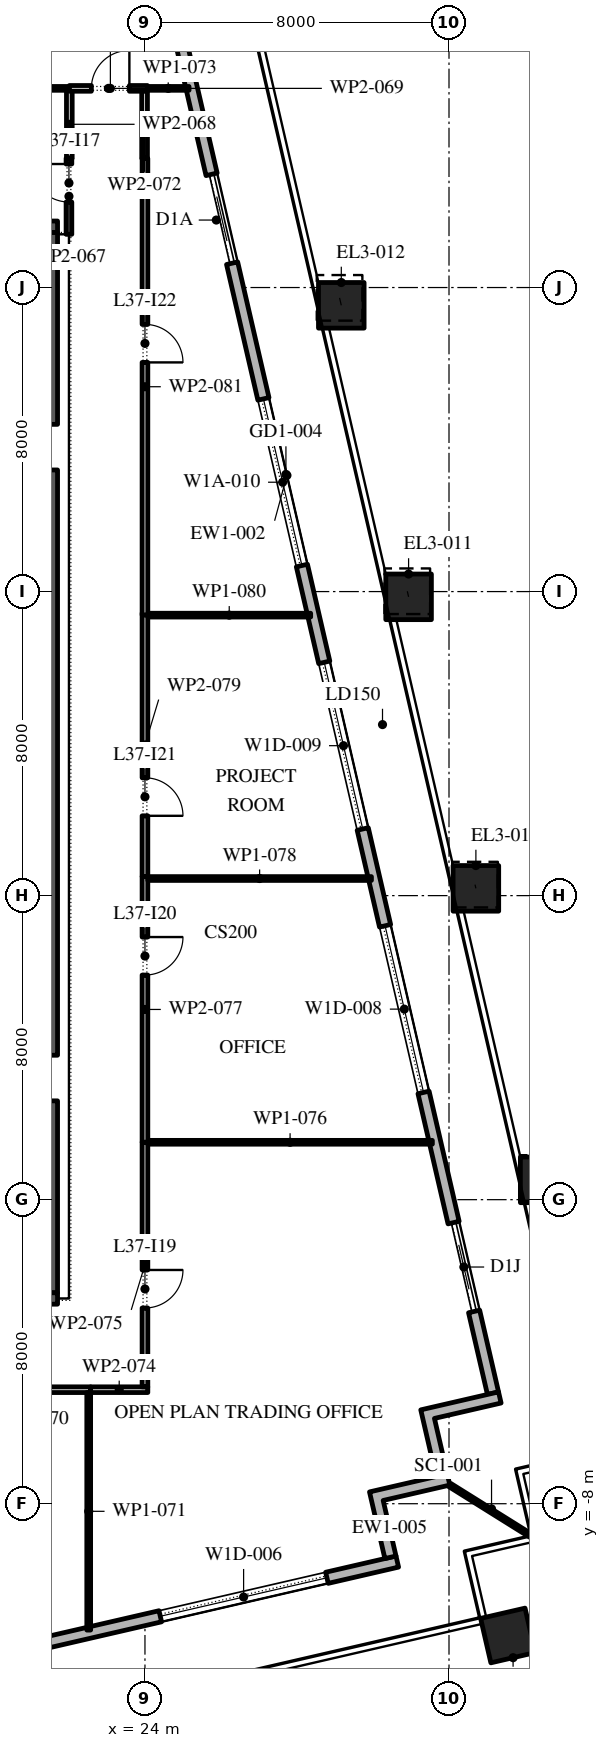
"""IFC4 building model, lengths in metres.
Left out: names, types, materials, properties, quantities, classifications, styles, units other than length and angle.
Written with IfcOpenShell. Run it as: python <this file> out.ifc"""

import sys

from ifc_helpers import new_model, si_unit, direction, frame, frame_2d, origin, origin_2d, place, context, subcontext, project, spatial, polyline, rectangle, outline, extrude, element, fill, save


model = new_model("IFC4")
c1 = context("Model", 3, precision=1e-05, world=origin(), true_north=direction((0.0, 1.0)))
c2 = subcontext(c1, "Body", "Model", "MODEL_VIEW")
j1 = project(units=[si_unit("LENGTHUNIT", "METRE"), si_unit("PLANEANGLEUNIT", "RADIAN")], contexts=[c1])
p1 = place(None, origin())
s1 = spatial("IfcSite", under=j1, at=p1, CompositionType="ELEMENT")
p2 = place(p1, origin())
s2 = spatial("IfcBuilding", under=s1, at=p2, CompositionType="ELEMENT")
p3 = place(p2, frame((0.0, 0.0, 171.6)))
s3 = spatial("IfcBuildingStorey", under=s2, at=p3, CompositionType="ELEMENT", Elevation=171.6)
p4 = place(p3, frame((33.551, -11.467, 0.0), z_axis=(0.0, 0.0, 1.0), x_axis=(0.974370064785, 0.224951054344, 0.0)))
e1 = element("IfcColumn", 1, at=p4, inside=s3, PredefinedType="COLUMN", context=c2, shape_type="SweptSolid", body=[
    extrude(rectangle(XDim=1.2, YDim=1.2, at=origin_2d()), origin(), (0.0, 0.0, 1.0), 4.2),
])
p5 = place(p3, frame((34.479, 0.521, 0.0), z_axis=(-0.002731884952, 0.01168316756, 0.999928017609), x_axis=(-0.973733900744, -0.227689021567, 0.0)))
e2 = element("IfcColumn", 2, at=p5, inside=s3, PredefinedType="COLUMN", context=c2, shape_type="SweptSolid", body=[
    extrude(rectangle(XDim=1.2, YDim=1.2, at=origin_2d()), origin(), (0.0, 0.0, 1.0), 4.2),
])
p6 = place(p3, frame((32.708, 8.191, 0.0), z_axis=(-0.005404472139, 0.023419379268, 0.999711120452), x_axis=(-0.974391195695, -0.224859506699, 0.0)))
e3 = element("IfcColumn", 3, at=p6, inside=s3, PredefinedType="COLUMN", context=c2, shape_type="SweptSolid", body=[
    extrude(rectangle(XDim=1.2, YDim=1.2, at=origin_2d()), origin(), (0.0, 0.0, 1.0), 4.201),
])
p7 = place(p3, frame((30.937, 15.862, 0.0), z_axis=(-0.008132851642, 0.035029353857, 0.999353191366), x_axis=(-0.974090845759, -0.226157078617, 0.0)))
e4 = element("IfcColumn", 4, at=p7, inside=s3, PredefinedType="COLUMN", context=c2, shape_type="SweptSolid", body=[
    extrude(rectangle(XDim=1.2, YDim=1.2, at=origin_2d()), origin(), (0.0, 0.0, 1.0), 4.203),
])
p8 = place(p3, frame((29.166, 23.532, 0.0), z_axis=(-0.010799619665, 0.046740289408, 0.998848694028), x_axis=(-0.974329962248, -0.225124686929, 0.0)))
e5 = element("IfcColumn", 5, at=p8, inside=s3, PredefinedType="COLUMN", context=c2, shape_type="SweptSolid", body=[
    extrude(rectangle(XDim=1.2, YDim=1.2, at=origin_2d()), origin(), (0.0, 0.0, 1.0), 4.205),
])
p9 = place(p3, frame((-17.592, -20.657, 0.0), z_axis=(0.0, 0.0, 1.0), x_axis=(0.974370243697, 0.224950279389, 0.0)))
e6 = element("IfcWall", 6, at=p9, inside=s3, PredefinedType="STANDARD", context=c2, shape_type="SweptSolid", body=[
    extrude(rectangle(XDim=49.5, YDim=0.3, at=frame_2d((24.75, 0.0))), origin(), (0.0, 0.0, 1.0), 4.0),
])
p10 = place(p9, frame((3.6, 0.0, 0.0)))
e7 = element("IfcOpeningElement", 7, at=p10, cuts=e6, PredefinedType="OPENING", context=c2, shape_type="SweptSolid", body=[
    extrude(rectangle(XDim=2.4, YDim=3.5, at=frame_2d((1.2, 1.75))), frame((0.0, 0.16, 0.0), z_axis=(0.0, -1.0, 0.0), x_axis=(1.0, 0.0, 0.0)), (0.0, 0.0, 1.0), 0.32),
])
p11 = place(p9, frame((9.9, 0.0, 0.45)))
e8 = element("IfcOpeningElement", 8, at=p11, cuts=e6, PredefinedType="OPENING", context=c2, shape_type="SweptSolid", body=[
    extrude(rectangle(XDim=4.5, YDim=2.575, at=frame_2d((2.25, 1.288))), frame((0.0, 0.16, 0.0), z_axis=(0.0, -1.0, 0.0), x_axis=(1.0, 0.0, 0.0)), (0.0, 0.0, 1.0), 0.32),
])
p12 = place(p9, frame((18.2, 0.0, 0.45)))
e9 = element("IfcOpeningElement", 9, at=p12, cuts=e6, PredefinedType="OPENING", context=c2, shape_type="SweptSolid", body=[
    extrude(rectangle(XDim=4.5, YDim=3.05, at=frame_2d((2.25, 1.525))), frame((0.0, 0.16, 0.0), z_axis=(0.0, -1.0, 0.0), x_axis=(1.0, 0.0, 0.0)), (0.0, 0.0, 1.0), 0.32),
])
p13 = place(p9, frame((26.5, 0.0, 0.45)))
e10 = element("IfcOpeningElement", 10, at=p13, cuts=e6, PredefinedType="OPENING", context=c2, shape_type="SweptSolid", body=[
    extrude(rectangle(XDim=4.5, YDim=2.75, at=frame_2d((2.25, 1.375))), frame((0.0, 0.16, 0.0), z_axis=(0.0, -1.0, 0.0), x_axis=(1.0, 0.0, 0.0)), (0.0, 0.0, 1.0), 0.32),
])
p14 = place(p9, frame((36.8, 0.0, 0.0)))
e11 = element("IfcOpeningElement", 11, at=p14, cuts=e6, PredefinedType="OPENING", context=c2, shape_type="SweptSolid", body=[
    extrude(rectangle(XDim=2.4, YDim=3.275, at=frame_2d((1.2, 1.637))), frame((0.0, 0.16, 0.0), z_axis=(0.0, -1.0, 0.0), x_axis=(1.0, 0.0, 0.0)), (0.0, 0.0, 1.0), 0.32),
])
p15 = place(p9, frame((43.1, 0.0, 0.45)))
e12 = element("IfcOpeningElement", 12, at=p15, cuts=e6, PredefinedType="OPENING", context=c2, shape_type="SweptSolid", body=[
    extrude(rectangle(XDim=4.5, YDim=2.875, at=frame_2d((2.25, 1.438))), frame((0.0, 0.16, 0.0), z_axis=(0.0, -1.0, 0.0), x_axis=(1.0, 0.0, 0.0)), (0.0, 0.0, 1.0), 0.32),
])
p16 = place(p3, frame((33.157, -5.092, 0.0), z_axis=(0.0, 0.0, 1.0), x_axis=(-0.224950279389, 0.974370243697, 0.0)))
e13 = element("IfcWall", 13, at=p16, inside=s3, PredefinedType="STANDARD", context=c2, shape_type="SweptSolid", body=[
    extrude(rectangle(XDim=49.5, YDim=0.3, at=frame_2d((24.75, 0.0))), origin(), (0.0, 0.0, 1.0), 4.0),
])
p17 = place(p16, frame((2.207, 0.0, 0.0)))
e14 = element("IfcOpeningElement", 14, at=p17, cuts=e13, PredefinedType="OPENING", context=c2, shape_type="SweptSolid", body=[
    extrude(rectangle(XDim=2.4, YDim=3.125, at=frame_2d((1.2, 1.562))), frame((0.0, 0.16, 0.0), z_axis=(0.0, -1.0, 0.0), x_axis=(1.0, 0.0, 0.0)), (0.0, 0.0, 1.0), 0.32),
])
p18 = place(p16, frame((8.121, 0.0, 0.45)))
e15 = element("IfcOpeningElement", 15, at=p18, cuts=e13, PredefinedType="OPENING", context=c2, shape_type="SweptSolid", body=[
    extrude(rectangle(XDim=4.5, YDim=2.875, at=frame_2d((2.25, 1.438))), frame((0.0, 0.16, 0.0), z_axis=(0.0, -1.0, 0.0), x_axis=(1.0, 0.0, 0.0)), (0.0, 0.0, 1.0), 0.32),
])
p19 = place(p16, frame((15.236, 0.0, 0.45)))
e16 = element("IfcOpeningElement", 16, at=p19, cuts=e13, PredefinedType="OPENING", context=c2, shape_type="SweptSolid", body=[
    extrude(rectangle(XDim=4.5, YDim=2.875, at=frame_2d((2.25, 1.438))), frame((0.0, 0.16, 0.0), z_axis=(0.0, -1.0, 0.0), x_axis=(1.0, 0.0, 0.0)), (0.0, 0.0, 1.0), 0.32),
])
p20 = place(p16, frame((22.35, 0.0, 0.45)))
e17 = element("IfcOpeningElement", 17, at=p20, cuts=e13, PredefinedType="OPENING", context=c2, shape_type="SweptSolid", body=[
    extrude(rectangle(XDim=4.5, YDim=3.0, at=frame_2d((2.25, 1.5))), frame((0.0, 0.16, 0.0), z_axis=(0.0, -1.0, 0.0), x_axis=(1.0, 0.0, 0.0)), (0.0, 0.0, 1.0), 0.32),
])
p21 = place(p16, frame((30.514, 0.0, 0.0)))
e18 = element("IfcOpeningElement", 18, at=p21, cuts=e13, PredefinedType="OPENING", context=c2, shape_type="SweptSolid", body=[
    extrude(rectangle(XDim=2.4, YDim=3.45, at=frame_2d((1.2, 1.725))), frame((0.0, 0.16, 0.0), z_axis=(0.0, -1.0, 0.0), x_axis=(1.0, 0.0, 0.0)), (0.0, 0.0, 1.0), 0.32),
])
p22 = place(p16, frame((36.579, 0.0, 0.45)))
e19 = element("IfcOpeningElement", 19, at=p22, cuts=e13, PredefinedType="OPENING", context=c2, shape_type="SweptSolid", body=[
    extrude(rectangle(XDim=4.5, YDim=3.05, at=frame_2d((2.25, 1.525))), frame((0.0, 0.16, 0.0), z_axis=(0.0, -1.0, 0.0), x_axis=(1.0, 0.0, 0.0)), (0.0, 0.0, 1.0), 0.32),
])
p23 = place(p16, frame((43.693, 0.0, 0.45)))
e20 = element("IfcOpeningElement", 20, at=p23, cuts=e13, PredefinedType="OPENING", context=c2, shape_type="SweptSolid", body=[
    extrude(rectangle(XDim=4.5, YDim=3.05, at=frame_2d((2.25, 1.525))), frame((0.0, 0.16, 0.0), z_axis=(0.0, -1.0, 0.0), x_axis=(1.0, 0.0, 0.0)), (0.0, 0.0, 1.0), 0.32),
])
p24 = place(p3, origin())
e21 = element("IfcWall", 21, at=p24, inside=s3, PredefinedType="STANDARD", context=c2, shape_type="SweptSolid", body=[
    extrude(outline(polyline([(31.662, -7.285), (31.257, -5.531), (33.303, -5.058), (33.371, -5.351), (31.617, -5.756), (32.022, -7.51), (30.268, -7.914), (30.605, -9.376), (30.313, -9.443), (29.908, -7.69), (31.662, -7.285)])), origin(), (0.0, 0.0, 1.0), 4.0),
])
p25 = place(p3, frame((32.022, -7.51, -0.05), z_axis=(0.0, 0.0, 1.0), x_axis=(0.848047176257, -0.529920736377, 0.0)))
e22 = element("IfcWall", 22, at=p25, inside=s3, PredefinedType="STANDARD", context=c2, shape_type="SweptSolid", body=[
    extrude(rectangle(XDim=2.526, YDim=0.1, at=frame_2d((1.263, 0.0))), origin(), (0.0, 0.0, 1.0), 4.05),
])
p26 = place(p3, frame((21.35, -2.45, 0.0), z_axis=(0.0, 0.0, 1.0), x_axis=(0.0, 1.0, 0.0)))
e23 = element("IfcWall", 23, at=p26, inside=s3, PredefinedType="SHEAR", context=c2, shape_type="SweptSolid", body=[
    extrude(rectangle(XDim=27.9, YDim=0.7, at=frame_2d((13.95, 0.0))), origin(), (0.0, 0.0, 1.0), 4.0),
])
p27 = place(p26, frame((5.05, 0.0, 0.0)))
e24 = element("IfcOpeningElement", 24, at=p27, cuts=e23, PredefinedType="OPENING", context=c2, shape_type="SweptSolid", body=[
    extrude(rectangle(XDim=1.2, YDim=2.1, at=frame_2d((0.6, 1.05))), frame((0.0, 0.36, 0.0), z_axis=(0.0, -1.0, 0.0), x_axis=(1.0, 0.0, 0.0)), (0.0, 0.0, 1.0), 0.72),
])
p28 = place(p26, frame((21.65, 0.0, 0.0)))
e25 = element("IfcOpeningElement", 25, at=p28, cuts=e23, PredefinedType="OPENING", context=c2, shape_type="SweptSolid", body=[
    extrude(rectangle(XDim=1.2, YDim=2.1, at=frame_2d((0.6, 1.05))), frame((0.0, 0.36, 0.0), z_axis=(0.0, -1.0, 0.0), x_axis=(1.0, 0.0, 0.0)), (0.0, 0.0, 1.0), 0.72),
])
for number, where, z_axis, x_axis in (
    (26, (10.3, -2.6, 0.0), (0.0, 0.0, 1.0), (1.0, 0.0, 0.0)),
    (27, (10.3, 25.6, 0.0), (0.0, 0.0, 1.0), (1.0, 0.0, 0.0)),
):
    element("IfcWall", number, at=place(p3, frame(where, z_axis=z_axis, x_axis=x_axis)), inside=s3, PredefinedType="SHEAR", context=c2, shape_type="SweptSolid", body=[
        extrude(rectangle(XDim=11.4, YDim=0.3, at=frame_2d((5.7, 0.0))), origin(), (0.0, 0.0, 1.0), 4.0),
    ])
p29 = place(p3, frame((17.97, 29.24, 0.0), z_axis=(0.0, 0.0, 1.0), x_axis=(1.0, 0.0, 0.0)))
e28 = element("IfcWall", 28, at=p29, inside=s3, PredefinedType="PARTITIONING", context=c2, shape_type="SweptSolid", body=[
    extrude(rectangle(XDim=4.04, YDim=0.1, at=frame_2d((2.02, 0.0))), origin(), (0.0, 0.0, 1.0), 4.0),
])
p30 = place(p3, frame((22.0, 25.4, 0.0), z_axis=(0.0, 0.0, 1.0), x_axis=(0.0, 1.0, 0.0)))
e29 = element("IfcWall", 29, at=p30, inside=s3, PredefinedType="PARTITIONING", context=c2, shape_type="SweptSolid", body=[
    extrude(rectangle(XDim=2.0, YDim=0.15, at=frame_2d((1.0, 0.0))), origin(), (0.0, 0.0, 1.0), 4.0),
])
p31 = place(p30, frame((0.85, 0.0, 0.0)))
e30 = element("IfcOpeningElement", 30, at=p31, cuts=e29, PredefinedType="OPENING", context=c2, shape_type="SweptSolid", body=[
    extrude(rectangle(XDim=1.0, YDim=2.1, at=frame_2d((0.5, 1.05))), frame((0.0, 0.085, 0.0), z_axis=(0.0, -1.0, 0.0), x_axis=(1.0, 0.0, 0.0)), (0.0, 0.0, 1.0), 0.17),
])
p32 = place(p3, frame((22.01, 27.4, 0.0), z_axis=(0.0, 0.0, 1.0), x_axis=(0.0, 1.0, 0.0)))
e31 = element("IfcWall", 31, at=p32, inside=s3, PredefinedType="PARTITIONING", context=c2, shape_type="SweptSolid", body=[
    extrude(rectangle(XDim=1.79, YDim=0.15, at=frame_2d((0.895, 0.0))), origin(), (0.0, 0.0, 1.0), 4.0),
])
p33 = place(p3, frame((22.01, 29.24, 0.0), z_axis=(0.0, 0.0, 1.0), x_axis=(1.0, 0.0, 0.0)))
e32 = element("IfcWall", 32, at=p33, inside=s3, PredefinedType="PARTITIONING", context=c2, shape_type="SweptSolid", body=[
    extrude(rectangle(XDim=2.055, YDim=0.15, at=frame_2d((1.027, 0.0))), origin(), (0.0, 0.0, 1.0), 4.0),
])
p34 = place(p33, frame((0.58, 0.0, 0.0)))
e33 = element("IfcOpeningElement", 33, at=p34, cuts=e32, PredefinedType="OPENING", context=c2, shape_type="SweptSolid", body=[
    extrude(rectangle(XDim=1.0, YDim=2.1, at=frame_2d((0.5, 1.05))), frame((0.0, 0.085, 0.0), z_axis=(0.0, -1.0, 0.0), x_axis=(1.0, 0.0, 0.0)), (0.0, 0.0, 1.0), 0.17),
])
p35 = place(p3, frame((22.57, -5.0, 0.0), z_axis=(0.0, 0.0, 1.0), x_axis=(-1.0, 0.0, 0.0)))
e34 = element("IfcWall", 34, at=p35, inside=s3, PredefinedType="PARTITIONING", context=c2, shape_type="SweptSolid", body=[
    extrude(rectangle(XDim=4.65, YDim=0.15, at=frame_2d((2.325, 0.0))), origin(), (0.0, 0.0, 1.0), 4.0),
])
p36 = place(p35, frame((2.75, 0.0, 0.0)))
e35 = element("IfcOpeningElement", 35, at=p36, cuts=e34, PredefinedType="OPENING", context=c2, shape_type="SweptSolid", body=[
    extrude(rectangle(XDim=1.0, YDim=2.1, at=frame_2d((0.5, 1.05))), frame((0.0, 0.085, 0.0), z_axis=(0.0, -1.0, 0.0), x_axis=(1.0, 0.0, 0.0)), (0.0, 0.0, 1.0), 0.17),
])
p37 = place(p3, frame((22.52, -5.075, 0.0), z_axis=(0.0, 0.0, 1.0), x_axis=(0.0, -1.0, 0.0)))
e36 = element("IfcWall", 36, at=p37, inside=s3, PredefinedType="PARTITIONING", context=c2, shape_type="SweptSolid", body=[
    extrude(rectangle(XDim=6.25, YDim=0.1, at=frame_2d((3.125, 0.0))), origin(), (0.0, 0.0, 1.0), 4.0),
])
p38 = place(p3, frame((23.99, 29.165, 0.0), z_axis=(0.0, 0.0, 1.0), x_axis=(0.0, -1.0, 0.0)))
e37 = element("IfcWall", 37, at=p38, inside=s3, PredefinedType="PARTITIONING", context=c2, shape_type="SweptSolid", body=[
    extrude(rectangle(XDim=1.765, YDim=0.15, at=frame_2d((0.883, 0.0))), origin(), (0.0, 0.0, 1.0), 4.0),
])
p39 = place(p3, frame((24.065, 29.24, 0.0), z_axis=(0.0, 0.0, 1.0), x_axis=(1.0, 0.0, 0.0)))
e38 = element("IfcWall", 38, at=p39, inside=s3, PredefinedType="PARTITIONING", context=c2, shape_type="SweptSolid", body=[
    extrude(rectangle(XDim=1.095, YDim=0.1, at=frame_2d((0.547, 0.0))), origin(), (0.0, 0.0, 1.0), 4.0),
])
p40 = place(p3, frame((24.075, -5.0, 0.0), z_axis=(0.0, 0.0, 1.0), x_axis=(-1.0, 0.0, 0.0)))
e39 = element("IfcWall", 39, at=p40, inside=s3, PredefinedType="PARTITIONING", context=c2, shape_type="SweptSolid", body=[
    extrude(rectangle(XDim=1.505, YDim=0.15, at=frame_2d((0.752, 0.0))), origin(), (0.0, 0.0, 1.0), 4.0),
])
p41 = place(p3, frame((24.0, 1.51, 0.0), z_axis=(0.0, 0.0, 1.0), x_axis=(0.0, -1.0, 0.0)))
e40 = element("IfcWall", 40, at=p41, inside=s3, PredefinedType="PARTITIONING", context=c2, shape_type="SweptSolid", body=[
    extrude(rectangle(XDim=6.435, YDim=0.15, at=frame_2d((3.218, 0.0))), origin(), (0.0, 0.0, 1.0), 4.0),
])
p42 = place(p41, frame((3.36, 0.0, 0.0)))
e41 = element("IfcOpeningElement", 41, at=p42, cuts=e40, PredefinedType="OPENING", context=c2, shape_type="SweptSolid", body=[
    extrude(rectangle(XDim=1.0, YDim=2.1, at=frame_2d((0.5, 1.05))), frame((0.0, 0.085, 0.0), z_axis=(0.0, -1.0, 0.0), x_axis=(1.0, 0.0, 0.0)), (0.0, 0.0, 1.0), 0.17),
])
p43 = place(p3, frame((24.075, 1.51, 0.0), z_axis=(0.0, 0.0, 1.0), x_axis=(1.0, 0.0, 0.0)))
e42 = element("IfcWall", 42, at=p43, inside=s3, PredefinedType="PARTITIONING", context=c2, shape_type="SweptSolid", body=[
    extrude(rectangle(XDim=7.487, YDim=0.1, at=frame_2d((3.744, 0.0))), origin(), (0.0, 0.0, 1.0), 4.0),
])
p44 = place(p3, frame((24.0, 8.5, 0.0), z_axis=(0.0, 0.0, 1.0), x_axis=(0.0, -1.0, 0.0)))
e43 = element("IfcWall", 43, at=p44, inside=s3, PredefinedType="PARTITIONING", context=c2, shape_type="SweptSolid", body=[
    extrude(rectangle(XDim=6.99, YDim=0.15, at=frame_2d((3.495, 0.0))), origin(), (0.0, 0.0, 1.0), 4.0),
])
p45 = place(p44, frame((1.59, 0.0, 0.0)))
e44 = element("IfcOpeningElement", 44, at=p45, cuts=e43, PredefinedType="OPENING", context=c2, shape_type="SweptSolid", body=[
    extrude(rectangle(XDim=1.0, YDim=2.1, at=frame_2d((0.5, 1.05))), frame((0.0, 0.085, 0.0), z_axis=(0.0, -1.0, 0.0), x_axis=(1.0, 0.0, 0.0)), (0.0, 0.0, 1.0), 0.17),
])
p46 = place(p3, frame((24.075, 8.45, 0.0), z_axis=(0.0, 0.0, 1.0), x_axis=(1.0, 0.0, 0.0)))
e45 = element("IfcWall", 45, at=p46, inside=s3, PredefinedType="PARTITIONING", context=c2, shape_type="SweptSolid", body=[
    extrude(rectangle(XDim=5.884, YDim=0.1, at=frame_2d((2.942, 0.0))), origin(), (0.0, 0.0, 1.0), 4.0),
])
p47 = place(p3, frame((24.0, 15.43, 0.0), z_axis=(0.0, 0.0, 1.0), x_axis=(0.0, -1.0, 0.0)))
e46 = element("IfcWall", 46, at=p47, inside=s3, PredefinedType="PARTITIONING", context=c2, shape_type="SweptSolid", body=[
    extrude(rectangle(XDim=6.93, YDim=0.15, at=frame_2d((3.465, 0.0))), origin(), (0.0, 0.0, 1.0), 4.0),
])
p48 = place(p47, frame((4.33, 0.0, 0.0)))
e47 = element("IfcOpeningElement", 47, at=p48, cuts=e46, PredefinedType="OPENING", context=c2, shape_type="SweptSolid", body=[
    extrude(rectangle(XDim=1.0, YDim=2.1, at=frame_2d((0.5, 1.05))), frame((0.0, 0.085, 0.0), z_axis=(0.0, -1.0, 0.0), x_axis=(1.0, 0.0, 0.0)), (0.0, 0.0, 1.0), 0.17),
])
p49 = place(p3, frame((24.075, 15.38, 0.0), z_axis=(0.0, 0.0, 1.0), x_axis=(1.0, 0.0, 0.0)))
e48 = element("IfcWall", 48, at=p49, inside=s3, PredefinedType="PARTITIONING", context=c2, shape_type="SweptSolid", body=[
    extrude(rectangle(XDim=4.285, YDim=0.1, at=frame_2d((2.143, 0.0))), origin(), (0.0, 0.0, 1.0), 4.0),
])
p50 = place(p3, frame((24.0, 27.4, 0.0), z_axis=(0.0, 0.0, 1.0), x_axis=(0.0, -1.0, 0.0)))
e49 = element("IfcWall", 49, at=p50, inside=s3, PredefinedType="PARTITIONING", context=c2, shape_type="SweptSolid", body=[
    extrude(rectangle(XDim=12.02, YDim=0.15, at=frame_2d((6.01, 0.0))), origin(), (0.0, 0.0, 1.0), 4.0),
])
p51 = place(p50, frame((4.37, 0.0, 0.0)))
e50 = element("IfcOpeningElement", 50, at=p51, cuts=e49, PredefinedType="OPENING", context=c2, shape_type="SweptSolid", body=[
    extrude(rectangle(XDim=1.0, YDim=2.1, at=frame_2d((0.5, 1.05))), frame((0.0, 0.085, 0.0), z_axis=(0.0, -1.0, 0.0), x_axis=(1.0, 0.0, 0.0)), (0.0, 0.0, 1.0), 0.17),
])
p52 = place(p15, origin())
e51 = element("IfcWindow", 51, at=p52, inside=s3, PartitioningType="DOUBLE_PANEL_VERTICAL", PredefinedType="WINDOW", context=c2, shape_type="SweptSolid", body=[
    extrude(rectangle(XDim=4.5, YDim=2.875, at=frame_2d((2.25, 1.438))), frame((0.0, 0.03, 0.0), z_axis=(0.0, -1.0, 0.0), x_axis=(1.0, 0.0, 0.0)), (0.0, 0.0, 1.0), 0.06),
])
fill(e12, e51)
p53 = place(p17, origin())
e52 = element("IfcDoor", 52, at=p53, inside=s3, OperationType="DOUBLE_DOOR_SLIDING", PredefinedType="DOOR", context=c2, shape_type="SweptSolid", body=[
    extrude(rectangle(XDim=2.4, YDim=3.125, at=frame_2d((1.2, 1.562))), frame((0.0, 0.025, 0.0), z_axis=(0.0, -1.0, 0.0), x_axis=(1.0, 0.0, 0.0)), (0.0, 0.0, 1.0), 0.05),
])
fill(e14, e52)
p54 = place(p18, origin())
e53 = element("IfcWindow", 53, at=p54, inside=s3, PartitioningType="DOUBLE_PANEL_VERTICAL", PredefinedType="WINDOW", context=c2, shape_type="SweptSolid", body=[
    extrude(rectangle(XDim=4.5, YDim=2.875, at=frame_2d((2.25, 1.438))), frame((0.0, 0.03, 0.0), z_axis=(0.0, -1.0, 0.0), x_axis=(1.0, 0.0, 0.0)), (0.0, 0.0, 1.0), 0.06),
])
fill(e15, e53)
p55 = place(p19, origin())
e54 = element("IfcWindow", 54, at=p55, inside=s3, PartitioningType="DOUBLE_PANEL_VERTICAL", PredefinedType="WINDOW", context=c2, shape_type="SweptSolid", body=[
    extrude(rectangle(XDim=4.5, YDim=2.875, at=frame_2d((2.25, 1.438))), frame((0.0, 0.03, 0.0), z_axis=(0.0, -1.0, 0.0), x_axis=(1.0, 0.0, 0.0)), (0.0, 0.0, 1.0), 0.06),
])
fill(e16, e54)
p56 = place(p20, origin())
e55 = element("IfcWindow", 55, at=p56, inside=s3, PartitioningType="DOUBLE_PANEL_VERTICAL", PredefinedType="WINDOW", context=c2, shape_type="SweptSolid", body=[
    extrude(rectangle(XDim=4.5, YDim=3.0, at=frame_2d((2.25, 1.5))), frame((0.0, 0.03, 0.0), z_axis=(0.0, -1.0, 0.0), x_axis=(1.0, 0.0, 0.0)), (0.0, 0.0, 1.0), 0.06),
])
fill(e17, e55)
p57 = place(p21, origin())
e56 = element("IfcDoor", 56, at=p57, inside=s3, OperationType="DOUBLE_DOOR_SLIDING", PredefinedType="DOOR", context=c2, shape_type="SweptSolid", body=[
    extrude(rectangle(XDim=2.4, YDim=3.45, at=frame_2d((1.2, 1.725))), frame((0.0, 0.025, 0.0), z_axis=(0.0, -1.0, 0.0), x_axis=(1.0, 0.0, 0.0)), (0.0, 0.0, 1.0), 0.05),
])
fill(e18, e56)
p58 = place(p31, origin())
e57 = element("IfcDoor", 57, at=p58, inside=s3, OperationType="SINGLE_SWING_LEFT", PredefinedType="DOOR", context=c2, shape_type="SweptSolid", body=[
    extrude(rectangle(XDim=1.0, YDim=2.1, at=frame_2d((0.5, 1.05))), frame((0.0, 0.025, 0.0), z_axis=(0.0, -1.0, 0.0), x_axis=(1.0, 0.0, 0.0)), (0.0, 0.0, 1.0), 0.05),
])
fill(e30, e57)
p59 = place(p42, origin())
e58 = element("IfcDoor", 58, at=p59, inside=s3, OperationType="SINGLE_SWING_RIGHT", PredefinedType="DOOR", context=c2, shape_type="SweptSolid", body=[
    extrude(rectangle(XDim=1.0, YDim=2.1, at=frame_2d((0.5, 1.05))), frame((0.0, 0.025, 0.0), z_axis=(0.0, -1.0, 0.0), x_axis=(1.0, 0.0, 0.0)), (0.0, 0.0, 1.0), 0.05),
])
fill(e41, e58)
p60 = place(p45, origin())
e59 = element("IfcDoor", 59, at=p60, inside=s3, OperationType="SINGLE_SWING_RIGHT", PredefinedType="DOOR", context=c2, shape_type="SweptSolid", body=[
    extrude(rectangle(XDim=1.0, YDim=2.1, at=frame_2d((0.5, 1.05))), frame((0.0, 0.025, 0.0), z_axis=(0.0, -1.0, 0.0), x_axis=(1.0, 0.0, 0.0)), (0.0, 0.0, 1.0), 0.05),
])
fill(e44, e59)
p61 = place(p48, origin())
e60 = element("IfcDoor", 60, at=p61, inside=s3, OperationType="SINGLE_SWING_LEFT", PredefinedType="DOOR", context=c2, shape_type="SweptSolid", body=[
    extrude(rectangle(XDim=1.0, YDim=2.1, at=frame_2d((0.5, 1.05))), frame((0.0, 0.025, 0.0), z_axis=(0.0, -1.0, 0.0), x_axis=(1.0, 0.0, 0.0)), (0.0, 0.0, 1.0), 0.05),
])
fill(e47, e60)
p62 = place(p51, origin())
e61 = element("IfcDoor", 61, at=p62, inside=s3, OperationType="SINGLE_SWING_LEFT", PredefinedType="DOOR", context=c2, shape_type="SweptSolid", body=[
    extrude(rectangle(XDim=1.0, YDim=2.1, at=frame_2d((0.5, 1.05))), frame((0.0, 0.025, 0.0), z_axis=(0.0, -1.0, 0.0), x_axis=(1.0, 0.0, 0.0)), (0.0, 0.0, 1.0), 0.05),
])
fill(e50, e61)
p63 = place(p34, origin())
e62 = element("IfcDoor", 62, at=p63, inside=s3, OperationType="SINGLE_SWING_LEFT", PredefinedType="DOOR", context=c2, shape_type="SweptSolid", body=[
    extrude(rectangle(XDim=1.0, YDim=2.1, at=frame_2d((0.5, 1.05))), frame((0.0, 0.025, 0.0), z_axis=(0.0, -1.0, 0.0), x_axis=(1.0, 0.0, 0.0)), (0.0, 0.0, 1.0), 0.05),
])
fill(e33, e62)
save(model, sys.argv[1])
